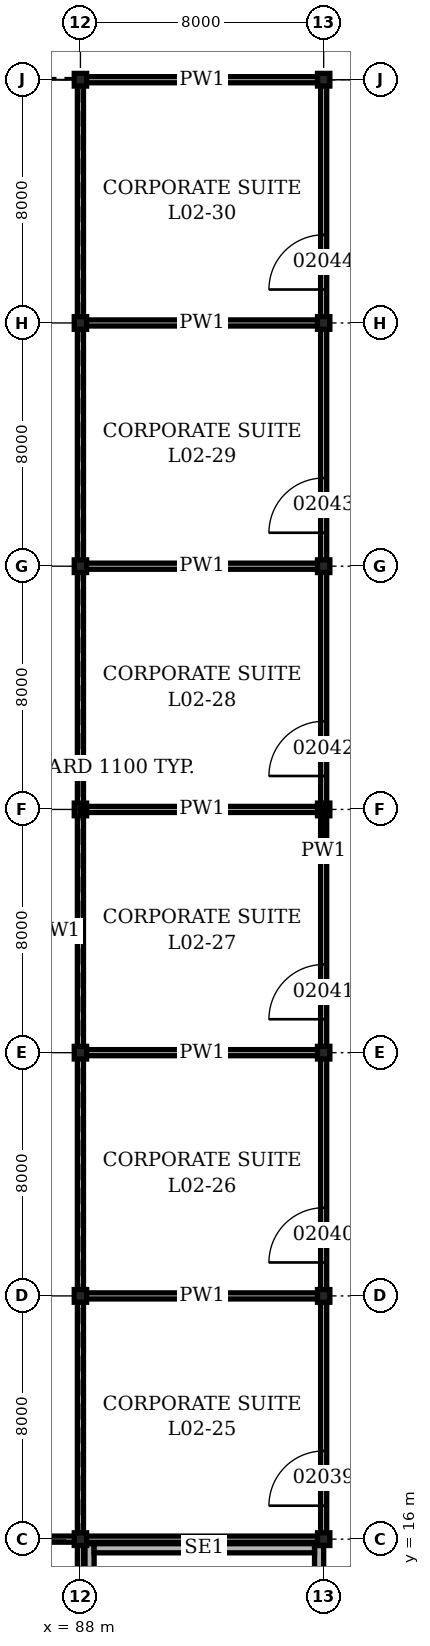
"""IFC4 building model, lengths in metres.
Left out: names, types, materials, properties, quantities, classifications, styles, units other than length and angle.
Written with IfcOpenShell. Run it as: python <this file> out.ifc"""

import sys

from ifc_helpers import new_model, si_unit, direction, frame, frame_2d, origin, origin_2d, place, context, subcontext, project, spatial, rectangle, i_section, extrude, element, fill, save


model = new_model("IFC4")
c1 = context("Model", 3, precision=1e-05, world=origin(), true_north=direction((0.0, 1.0)))
c2 = subcontext(c1, "Body", "Model", "MODEL_VIEW")
j1 = project(units=[si_unit("LENGTHUNIT", "METRE"), si_unit("PLANEANGLEUNIT", "RADIAN")], contexts=[c1])
p1 = place(None, origin())
s1 = spatial("IfcSite", under=j1, at=p1, CompositionType="ELEMENT")
p2 = place(p1, origin())
s2 = spatial("IfcBuilding", under=s1, at=p2, CompositionType="ELEMENT")
p3 = place(p2, frame((0.0, 0.0, 9.9)))
s3 = spatial("IfcBuildingStorey", under=s2, at=p3, CompositionType="ELEMENT", Elevation=9.9)
for number, where, z_axis, x_axis in (
    (1, (88.0, 16.0, 0.0), (0.0, 0.0, 1.0), (1.0, 0.0, 0.0)),
    (2, (88.0, 24.0, 0.0), (0.0, 0.0, 1.0), (1.0, 0.0, 0.0)),
    (3, (88.0, 32.0, 0.0), (0.0, 0.0, 1.0), (1.0, 0.0, 0.0)),
    (4, (88.0, 40.0, 0.0), (0.0, 0.0, 1.0), (1.0, 0.0, 0.0)),
    (5, (88.0, 48.0, 0.0), (0.0, 0.0, 1.0), (1.0, 0.0, 0.0)),
    (6, (88.0, 56.0, 0.0), (0.0, 0.0, 1.0), (1.0, 0.0, 0.0)),
    (7, (88.0, 64.0, 0.0), (0.0, 0.0, 1.0), (1.0, 0.0, 0.0)),
    (8, (96.0, 16.0, 0.0), (0.0, 0.0, 1.0), (1.0, 0.0, 0.0)),
    (9, (96.0, 24.0, 0.0), (0.0, 0.0, 1.0), (1.0, 0.0, 0.0)),
    (10, (96.0, 32.0, 0.0), (0.0, 0.0, 1.0), (1.0, 0.0, 0.0)),
    (11, (96.0, 40.0, 0.0), (0.0, 0.0, 1.0), (1.0, 0.0, 0.0)),
    (12, (96.0, 48.0, 0.0), (0.0, 0.0, 1.0), (1.0, 0.0, 0.0)),
    (13, (96.0, 56.0, 0.0), (0.0, 0.0, 1.0), (1.0, 0.0, 0.0)),
    (14, (96.0, 64.0, 0.0), (0.0, 0.0, 1.0), (1.0, 0.0, 0.0)),
):
    element("IfcColumn", number, at=place(p3, frame(where, z_axis=z_axis, x_axis=x_axis)), inside=s3, PredefinedType="COLUMN", context=c2, shape_type="SweptSolid", body=[
        extrude(i_section(OverallWidth=0.406, OverallDepth=0.417, WebThickness=0.03, FlangeThickness=0.048, at=origin_2d()), origin(), (0.0, 0.0, 1.0), 5.0),
    ])
p4 = place(p3, frame((88.3, 5.0, 0.0), z_axis=(0.0, 0.0, 1.0), x_axis=(0.0, 1.0, 0.0)))
e15 = element("IfcWall", 15, at=p4, inside=s3, PredefinedType="SOLIDWALL", context=c2, shape_type="SweptSolid", body=[
    extrude(rectangle(XDim=10.85, YDim=0.3, at=frame_2d((5.425, 0.0))), origin(), (0.0, 0.0, 1.0), 4.8),
])
p5 = place(p3, frame((95.85, 5.0, 0.0), z_axis=(0.0, 0.0, 1.0), x_axis=(0.0, 1.0, 0.0)))
e16 = element("IfcWall", 16, at=p5, inside=s3, PredefinedType="SOLIDWALL", context=c2, shape_type="SweptSolid", body=[
    extrude(rectangle(XDim=10.792, YDim=0.3, at=frame_2d((5.396, 0.0))), origin(), (0.0, 0.0, 1.0), 4.8),
])
p6 = place(p3, frame((88.45, 15.7, 0.0), z_axis=(0.0, 0.0, 1.0), x_axis=(1.0, 0.0, 0.0)))
e17 = element("IfcWall", 17, at=p6, inside=s3, PredefinedType="SOLIDWALL", context=c2, shape_type="SweptSolid", body=[
    extrude(rectangle(XDim=7.25, YDim=0.3, at=frame_2d((3.625, 0.0))), origin(), (0.0, 0.0, 1.0), 4.8),
])
p7 = place(p3, frame((16.1, 16.0, 0.0), z_axis=(0.0, 0.0, 1.0), x_axis=(1.0, 0.0, 0.0)))
e18 = element("IfcWall", 18, at=p7, inside=s3, PredefinedType="PARTITIONING", context=c2, shape_type="SweptSolid", body=[
    extrude(rectangle(XDim=79.8, YDim=0.2, at=frame_2d((39.9, 0.0))), origin(), (0.0, 0.0, 1.0), 4.028),
])
for number, where, z_axis, x_axis in (
    (19, (88.1, 24.0, 0.0), (0.0, 0.0, 1.0), (1.0, 0.0, 0.0)),
    (20, (88.1, 32.0, 0.0), (0.0, 0.0, 1.0), (1.0, 0.0, 0.0)),
    (21, (88.1, 40.0, 0.0), (0.0, 0.0, 1.0), (1.0, 0.0, 0.0)),
    (22, (88.1, 48.0, 0.0), (0.0, 0.0, 1.0), (1.0, 0.0, 0.0)),
    (23, (88.1, 56.0, 0.0), (0.0, 0.0, 1.0), (1.0, 0.0, 0.0)),
):
    element("IfcWall", number, at=place(p3, frame(where, z_axis=z_axis, x_axis=x_axis)), inside=s3, PredefinedType="PARTITIONING", context=c2, shape_type="SweptSolid", body=[
        extrude(rectangle(XDim=7.8, YDim=0.2, at=frame_2d((3.9, 0.0))), origin(), (0.0, 0.0, 1.0), 4.072),
    ])
p8 = place(p3, frame((88.1, 64.0, 0.0), z_axis=(0.0, 0.0, 1.0), x_axis=(1.0, 0.0, 0.0)))
e24 = element("IfcWall", 24, at=p8, inside=s3, PredefinedType="PARTITIONING", context=c2, shape_type="SweptSolid", body=[
    extrude(rectangle(XDim=7.8, YDim=0.2, at=frame_2d((3.9, 0.0))), origin(), (0.0, 0.0, 1.0), 4.028),
])
p9 = place(p3, frame((88.0, 8.1, 0.0), z_axis=(0.0, 0.0, 1.0), x_axis=(0.0, 1.0, 0.0)))
e25 = element("IfcWall", 25, at=p9, inside=s3, PredefinedType="PARTITIONING", context=c2, shape_type="SweptSolid", body=[
    extrude(rectangle(XDim=55.8, YDim=0.2, at=frame_2d((27.9, 0.0))), origin(), (0.0, 0.0, 1.0), 4.028),
])
p10 = place(p3, frame((96.0, 16.1, 0.0), z_axis=(0.0, 0.0, 1.0), x_axis=(0.0, 1.0, 0.0)))
e26 = element("IfcWall", 26, at=p10, inside=s3, PredefinedType="PARTITIONING", context=c2, shape_type="SweptSolid", body=[
    extrude(rectangle(XDim=47.8, YDim=0.2, at=frame_2d((23.9, 0.0))), origin(), (0.0, 0.0, 1.0), 4.028),
])
p11 = place(p10, frame((1.0, 0.0, 0.0)))
e27 = element("IfcOpeningElement", 27, at=p11, cuts=e26, PredefinedType="OPENING", context=c2, shape_type="SweptSolid", body=[
    extrude(rectangle(XDim=1.8, YDim=2.4, at=frame_2d((0.9, 1.2))), frame((0.0, 0.11, 0.0), z_axis=(0.0, -1.0, 0.0), x_axis=(1.0, 0.0, 0.0)), (0.0, 0.0, 1.0), 0.22),
])
p12 = place(p10, frame((9.0, 0.0, 0.0)))
e28 = element("IfcOpeningElement", 28, at=p12, cuts=e26, PredefinedType="OPENING", context=c2, shape_type="SweptSolid", body=[
    extrude(rectangle(XDim=1.8, YDim=2.4, at=frame_2d((0.9, 1.2))), frame((0.0, 0.11, 0.0), z_axis=(0.0, -1.0, 0.0), x_axis=(1.0, 0.0, 0.0)), (0.0, 0.0, 1.0), 0.22),
])
p13 = place(p10, frame((17.0, 0.0, 0.0)))
e29 = element("IfcOpeningElement", 29, at=p13, cuts=e26, PredefinedType="OPENING", context=c2, shape_type="SweptSolid", body=[
    extrude(rectangle(XDim=1.8, YDim=2.4, at=frame_2d((0.9, 1.2))), frame((0.0, 0.11, 0.0), z_axis=(0.0, -1.0, 0.0), x_axis=(1.0, 0.0, 0.0)), (0.0, 0.0, 1.0), 0.22),
])
p14 = place(p10, frame((25.0, 0.0, 0.0)))
e30 = element("IfcOpeningElement", 30, at=p14, cuts=e26, PredefinedType="OPENING", context=c2, shape_type="SweptSolid", body=[
    extrude(rectangle(XDim=1.8, YDim=2.4, at=frame_2d((0.9, 1.2))), frame((0.0, 0.11, 0.0), z_axis=(0.0, -1.0, 0.0), x_axis=(1.0, 0.0, 0.0)), (0.0, 0.0, 1.0), 0.22),
])
p15 = place(p10, frame((33.0, 0.0, 0.0)))
e31 = element("IfcOpeningElement", 31, at=p15, cuts=e26, PredefinedType="OPENING", context=c2, shape_type="SweptSolid", body=[
    extrude(rectangle(XDim=1.8, YDim=2.4, at=frame_2d((0.9, 1.2))), frame((0.0, 0.11, 0.0), z_axis=(0.0, -1.0, 0.0), x_axis=(1.0, 0.0, 0.0)), (0.0, 0.0, 1.0), 0.22),
])
p16 = place(p10, frame((41.0, 0.0, 0.0)))
e32 = element("IfcOpeningElement", 32, at=p16, cuts=e26, PredefinedType="OPENING", context=c2, shape_type="SweptSolid", body=[
    extrude(rectangle(XDim=1.8, YDim=2.4, at=frame_2d((0.9, 1.2))), frame((0.0, 0.11, 0.0), z_axis=(0.0, -1.0, 0.0), x_axis=(1.0, 0.0, 0.0)), (0.0, 0.0, 1.0), 0.22),
])
p17 = place(p11, origin())
e33 = element("IfcDoor", 33, at=p17, inside=s3, OperationType="DOUBLE_DOOR_DOUBLE_SWING", PredefinedType="DOOR", context=c2, shape_type="SweptSolid", body=[
    extrude(rectangle(XDim=1.8, YDim=2.4, at=frame_2d((0.9, 1.2))), frame((0.0, 0.1, 0.0), z_axis=(0.0, -1.0, 0.0), x_axis=(1.0, 0.0, 0.0)), (0.0, 0.0, 1.0), 0.199),
])
fill(e27, e33)
p18 = place(p12, origin())
e34 = element("IfcDoor", 34, at=p18, inside=s3, OperationType="DOUBLE_DOOR_DOUBLE_SWING", PredefinedType="DOOR", context=c2, shape_type="SweptSolid", body=[
    extrude(rectangle(XDim=1.8, YDim=2.4, at=frame_2d((0.9, 1.2))), frame((0.0, 0.1, 0.0), z_axis=(0.0, -1.0, 0.0), x_axis=(1.0, 0.0, 0.0)), (0.0, 0.0, 1.0), 0.199),
])
fill(e28, e34)
p19 = place(p13, origin())
e35 = element("IfcDoor", 35, at=p19, inside=s3, OperationType="DOUBLE_DOOR_DOUBLE_SWING", PredefinedType="DOOR", context=c2, shape_type="SweptSolid", body=[
    extrude(rectangle(XDim=1.8, YDim=2.4, at=frame_2d((0.9, 1.2))), frame((0.0, 0.1, 0.0), z_axis=(0.0, -1.0, 0.0), x_axis=(1.0, 0.0, 0.0)), (0.0, 0.0, 1.0), 0.199),
])
fill(e29, e35)
p20 = place(p14, origin())
e36 = element("IfcDoor", 36, at=p20, inside=s3, OperationType="DOUBLE_DOOR_DOUBLE_SWING", PredefinedType="DOOR", context=c2, shape_type="SweptSolid", body=[
    extrude(rectangle(XDim=1.8, YDim=2.4, at=frame_2d((0.9, 1.2))), frame((0.0, 0.1, 0.0), z_axis=(0.0, -1.0, 0.0), x_axis=(1.0, 0.0, 0.0)), (0.0, 0.0, 1.0), 0.199),
])
fill(e30, e36)
p21 = place(p15, origin())
e37 = element("IfcDoor", 37, at=p21, inside=s3, OperationType="DOUBLE_DOOR_DOUBLE_SWING", PredefinedType="DOOR", context=c2, shape_type="SweptSolid", body=[
    extrude(rectangle(XDim=1.8, YDim=2.4, at=frame_2d((0.9, 1.2))), frame((0.0, 0.1, 0.0), z_axis=(0.0, -1.0, 0.0), x_axis=(1.0, 0.0, 0.0)), (0.0, 0.0, 1.0), 0.199),
])
fill(e31, e37)
p22 = place(p16, origin())
e38 = element("IfcDoor", 38, at=p22, inside=s3, OperationType="DOUBLE_DOOR_DOUBLE_SWING", PredefinedType="DOOR", context=c2, shape_type="SweptSolid", body=[
    extrude(rectangle(XDim=1.8, YDim=2.4, at=frame_2d((0.9, 1.2))), frame((0.0, 0.1, 0.0), z_axis=(0.0, -1.0, 0.0), x_axis=(1.0, 0.0, 0.0)), (0.0, 0.0, 1.0), 0.199),
])
fill(e32, e38)
save(model, sys.argv[1])
